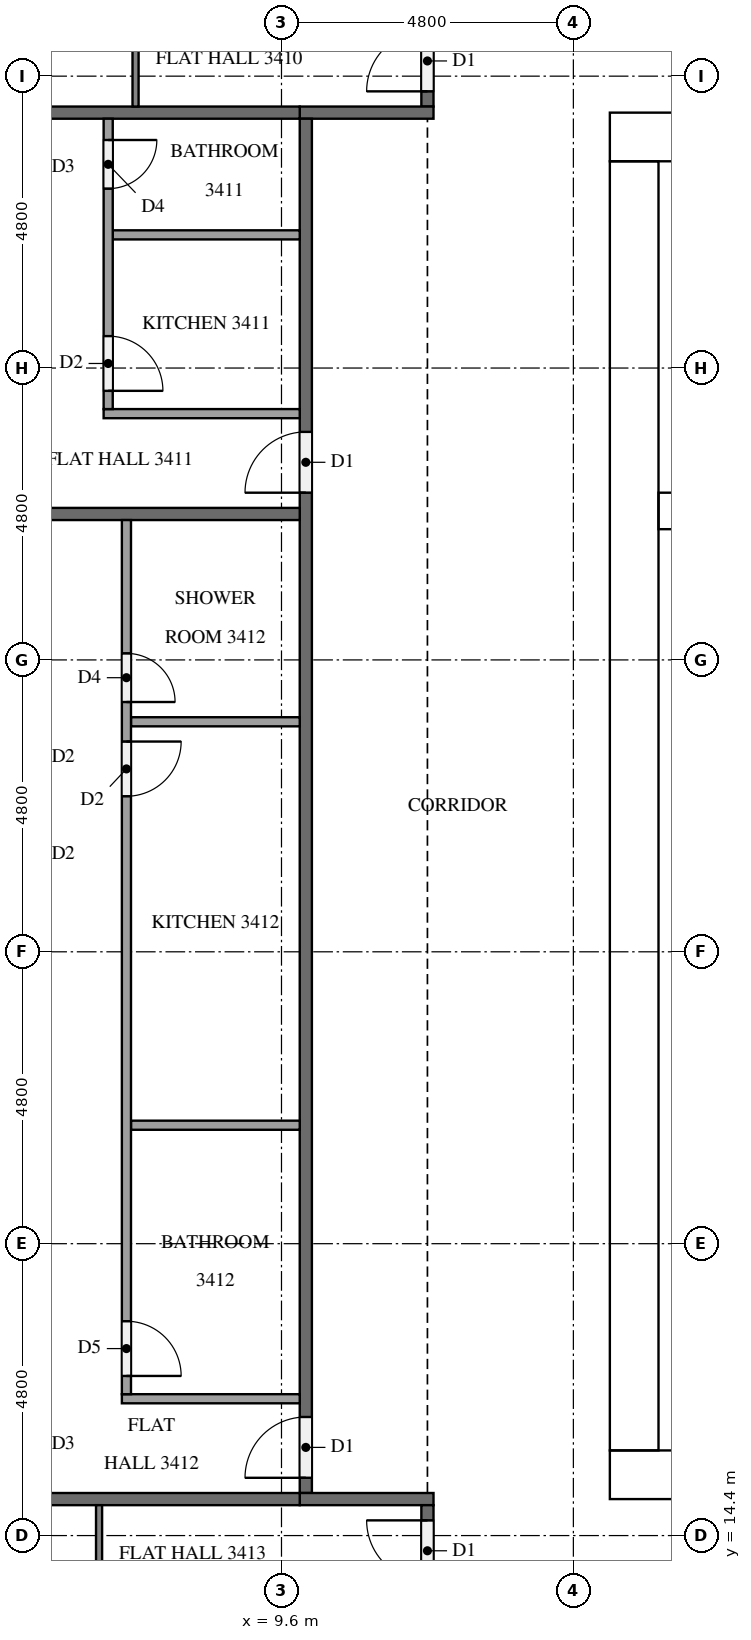
"""IFC4 building model, lengths in metres.
Left out: names, types, materials, properties, quantities, classifications, styles, units other than length and angle.
Written with IfcOpenShell. Run it as: python <this file> out.ifc"""

import sys

from ifc_helpers import new_model, si_unit, direction, frame, frame_2d, origin, place, context, subcontext, project, spatial, rectangle, extrude, element, fill, save


model = new_model("IFC4")
c1 = context("Model", 3, precision=1e-05, world=origin(), true_north=direction((0.0, 1.0)))
c2 = subcontext(c1, "Body", "Model", "MODEL_VIEW")
j1 = project(units=[si_unit("LENGTHUNIT", "METRE"), si_unit("PLANEANGLEUNIT", "RADIAN")], contexts=[c1])
p1 = place(None, origin())
s1 = spatial("IfcSite", under=j1, at=p1, CompositionType="ELEMENT")
p2 = place(p1, origin())
s2 = spatial("IfcBuilding", under=s1, at=p2, CompositionType="ELEMENT")
p3 = place(p2, frame((0.0, 0.0, 133.1)))
s3 = spatial("IfcBuildingStorey", under=s2, at=p3, CompositionType="ELEMENT", Elevation=133.1)
p4 = place(p3, frame((15.0, 15.4, 0.0), z_axis=(0.0, 0.0, 1.0), x_axis=(1.0, 0.0, 0.0)))
e1 = element("IfcWall", 1, at=p4, inside=s3, PredefinedType="SHEAR", context=c2, shape_type="SweptSolid", body=[
    extrude(rectangle(XDim=32.4, YDim=0.8, at=frame_2d((16.2, 0.0))), origin(), (0.0, 0.0, 1.0), 3.2),
])
p5 = place(p4, frame((15.3, 0.0, 0.0)))
e2 = element("IfcOpeningElement", 2, at=p5, cuts=e1, PredefinedType="OPENING", context=c2, shape_type="SweptSolid", body=[
    extrude(rectangle(XDim=1.8, YDim=2.1, at=frame_2d((0.9, 1.05))), frame((0.0, 0.41, 0.0), z_axis=(0.0, -1.0, 0.0), x_axis=(1.0, 0.0, 0.0)), (0.0, 0.0, 1.0), 0.82),
])
p6 = place(p3, frame((15.0, 37.4, 0.0), z_axis=(0.0, 0.0, 1.0), x_axis=(1.0, 0.0, 0.0)))
e3 = element("IfcWall", 3, at=p6, inside=s3, PredefinedType="SHEAR", context=c2, shape_type="SweptSolid", body=[
    extrude(rectangle(XDim=32.4, YDim=0.8, at=frame_2d((16.2, 0.0))), origin(), (0.0, 0.0, 1.0), 3.2),
])
p7 = place(p6, frame((15.3, 0.0, 0.0)))
e4 = element("IfcOpeningElement", 4, at=p7, cuts=e3, PredefinedType="OPENING", context=c2, shape_type="SweptSolid", body=[
    extrude(rectangle(XDim=1.8, YDim=2.1, at=frame_2d((0.9, 1.05))), frame((0.0, 0.41, 0.0), z_axis=(0.0, -1.0, 0.0), x_axis=(1.0, 0.0, 0.0)), (0.0, 0.0, 1.0), 0.82),
])
p8 = place(p6, frame((1.51, 0.0, 0.0)))
e5 = element("IfcOpeningElement", 5, at=p8, cuts=e3, PredefinedType="OPENING", context=c2, shape_type="SweptSolid", body=[
    extrude(rectangle(XDim=1.0, YDim=2.1, at=frame_2d((0.5, 1.05))), frame((0.0, 0.41, 0.0), z_axis=(0.0, -1.0, 0.0), x_axis=(1.0, 0.0, 0.0)), (0.0, 0.0, 1.0), 0.82),
])
p9 = place(p6, frame((5.11, 0.0, 0.0)))
e6 = element("IfcOpeningElement", 6, at=p9, cuts=e3, PredefinedType="OPENING", context=c2, shape_type="SweptSolid", body=[
    extrude(rectangle(XDim=1.0, YDim=2.1, at=frame_2d((0.5, 1.05))), frame((0.0, 0.41, 0.0), z_axis=(0.0, -1.0, 0.0), x_axis=(1.0, 0.0, 0.0)), (0.0, 0.0, 1.0), 0.82),
])
p10 = place(p3, frame((15.4, 15.8, 0.0), z_axis=(0.0, 0.0, 1.0), x_axis=(0.0, 1.0, 0.0)))
e7 = element("IfcWall", 7, at=p10, inside=s3, PredefinedType="SHEAR", context=c2, shape_type="SweptSolid", body=[
    extrude(rectangle(XDim=21.2, YDim=0.8, at=frame_2d((10.6, 0.0))), origin(), (0.0, 0.0, 1.0), 3.2),
])
p11 = place(p10, frame((4.96, 0.0, 0.0)))
e8 = element("IfcOpeningElement", 8, at=p11, cuts=e7, PredefinedType="OPENING", context=c2, shape_type="SweptSolid", body=[
    extrude(rectangle(XDim=1.2, YDim=2.1, at=frame_2d((0.6, 1.05))), frame((0.0, 0.41, 0.0), z_axis=(0.0, -1.0, 0.0), x_axis=(1.0, 0.0, 0.0)), (0.0, 0.0, 1.0), 0.82),
])
p12 = place(p3, frame((15.8, 31.25, 0.0), z_axis=(0.0, 0.0, 1.0), x_axis=(1.0, 0.0, 0.0)))
e9 = element("IfcWall", 9, at=p12, inside=s3, PredefinedType="SHEAR", context=c2, shape_type="SweptSolid", body=[
    extrude(rectangle(XDim=7.0, YDim=0.6, at=frame_2d((3.5, 0.0))), origin(), (0.0, 0.0, 1.0), 3.2),
])
p13 = place(p3, frame((12.0, 37.9, 0.0), z_axis=(0.0, 0.0, 1.0), x_axis=(0.0, 1.0, 0.0)))
e10 = element("IfcWall", 10, at=p13, inside=s3, PredefinedType="PARTITIONING", context=c2, shape_type="SweptSolid", body=[
    extrude(rectangle(XDim=2.8, YDim=0.2, at=frame_2d((1.4, 0.0))), origin(), (0.0, 0.0, 1.0), 3.2),
])
p14 = place(p13, frame((0.25, 0.0, 0.0)))
e11 = element("IfcOpeningElement", 11, at=p14, cuts=e10, PredefinedType="OPENING", context=c2, shape_type="SweptSolid", body=[
    extrude(rectangle(XDim=1.0, YDim=2.1, at=frame_2d((0.5, 1.05))), frame((0.0, 0.11, 0.0), z_axis=(0.0, -1.0, 0.0), x_axis=(1.0, 0.0, 0.0)), (0.0, 0.0, 1.0), 0.22),
])
p15 = place(p3, frame((12.1, 37.8, 0.0), z_axis=(0.0, 0.0, 1.0), x_axis=(-1.0, 0.0, 0.0)))
e12 = element("IfcWall", 12, at=p15, inside=s3, PredefinedType="PARTITIONING", context=c2, shape_type="SweptSolid", body=[
    extrude(rectangle(XDim=2.2, YDim=0.2, at=frame_2d((1.1, 0.0))), origin(), (0.0, 0.0, 1.0), 3.2),
])
p16 = place(p3, frame((10.0, 15.1, 0.0), z_axis=(0.0, 0.0, 1.0), x_axis=(0.0, 1.0, 0.0)))
e13 = element("IfcWall", 13, at=p16, inside=s3, PredefinedType="PARTITIONING", context=c2, shape_type="SweptSolid", body=[
    extrude(rectangle(XDim=22.6, YDim=0.2, at=frame_2d((11.3, 0.0))), origin(), (0.0, 0.0, 1.0), 3.2),
])
p17 = place(p16, frame((16.45, 0.0, 0.0)))
e14 = element("IfcOpeningElement", 14, at=p17, cuts=e13, PredefinedType="OPENING", context=c2, shape_type="SweptSolid", body=[
    extrude(rectangle(XDim=1.0, YDim=2.1, at=frame_2d((0.5, 1.05))), frame((0.0, 0.11, 0.0), z_axis=(0.0, -1.0, 0.0), x_axis=(1.0, 0.0, 0.0)), (0.0, 0.0, 1.0), 0.22),
])
p18 = place(p16, frame((0.25, 0.0, 0.0)))
e15 = element("IfcOpeningElement", 15, at=p18, cuts=e13, PredefinedType="OPENING", context=c2, shape_type="SweptSolid", body=[
    extrude(rectangle(XDim=1.0, YDim=2.1, at=frame_2d((0.5, 1.05))), frame((0.0, 0.11, 0.0), z_axis=(0.0, -1.0, 0.0), x_axis=(1.0, 0.0, 0.0)), (0.0, 0.0, 1.0), 0.22),
])
p19 = place(p3, frame((9.9, 15.0, 0.0), z_axis=(0.0, 0.0, 1.0), x_axis=(1.0, 0.0, 0.0)))
e16 = element("IfcWall", 16, at=p19, inside=s3, PredefinedType="PARTITIONING", context=c2, shape_type="SweptSolid", body=[
    extrude(rectangle(XDim=2.2, YDim=0.2, at=frame_2d((1.1, 0.0))), origin(), (0.0, 0.0, 1.0), 3.2),
])
p20 = place(p3, frame((12.0, 12.1, 0.0), z_axis=(0.0, 0.0, 1.0), x_axis=(0.0, 1.0, 0.0)))
e17 = element("IfcWall", 17, at=p20, inside=s3, PredefinedType="PARTITIONING", context=c2, shape_type="SweptSolid", body=[
    extrude(rectangle(XDim=2.8, YDim=0.2, at=frame_2d((1.4, 0.0))), origin(), (0.0, 0.0, 1.0), 3.2),
])
p21 = place(p20, frame((1.55, 0.0, 0.0)))
e18 = element("IfcOpeningElement", 18, at=p21, cuts=e17, PredefinedType="OPENING", context=c2, shape_type="SweptSolid", body=[
    extrude(rectangle(XDim=1.0, YDim=2.1, at=frame_2d((0.5, 1.05))), frame((0.0, 0.11, 0.0), z_axis=(0.0, -1.0, 0.0), x_axis=(1.0, 0.0, 0.0)), (0.0, 0.0, 1.0), 0.22),
])
p22 = place(p3, frame((0.375, 37.8, 0.0), z_axis=(0.0, 0.0, 1.0), x_axis=(1.0, 0.0, 0.0)))
e19 = element("IfcWall", 19, at=p22, inside=s3, PredefinedType="PARTITIONING", context=c2, shape_type="SweptSolid", body=[
    extrude(rectangle(XDim=9.525, YDim=0.2, at=frame_2d((4.762, 0.0))), origin(), (0.0, 0.0, 1.0), 3.2),
])
for number, where, z_axis, x_axis in (
    (20, (0.1, 31.2, 0.0), (0.0, 0.0, 1.0), (1.0, 0.0, 0.0)),
    (21, (0.1, 15.0, 0.0), (0.0, 0.0, 1.0), (1.0, 0.0, 0.0)),
):
    element("IfcWall", number, at=place(p3, frame(where, z_axis=z_axis, x_axis=x_axis)), inside=s3, PredefinedType="PARTITIONING", context=c2, shape_type="SweptSolid", body=[
        extrude(rectangle(XDim=9.8, YDim=0.2, at=frame_2d((4.9, 0.0))), origin(), (0.0, 0.0, 1.0), 3.2),
    ])
p23 = place(p3, frame((7.2, 37.9, 0.0), z_axis=(0.0, 0.0, 1.0), x_axis=(0.0, 1.0, 0.0)))
e22 = element("IfcWall", 22, at=p23, inside=s3, PredefinedType="PARTITIONING", context=c2, shape_type="SweptSolid", body=[
    extrude(rectangle(XDim=14.8, YDim=0.1, at=frame_2d((7.4, 0.0))), origin(), (0.0, 0.0, 1.0), 3.2),
])
p24 = place(p23, frame((4.05, 0.0, 0.0)))
e23 = element("IfcOpeningElement", 23, at=p24, cuts=e22, PredefinedType="OPENING", context=c2, shape_type="SweptSolid", body=[
    extrude(rectangle(XDim=0.9, YDim=2.1, at=frame_2d((0.45, 1.05))), frame((0.0, 0.06, 0.0), z_axis=(0.0, -1.0, 0.0), x_axis=(1.0, 0.0, 0.0)), (0.0, 0.0, 1.0), 0.12),
])
p25 = place(p23, frame((5.65, 0.0, 0.0)))
e24 = element("IfcOpeningElement", 24, at=p25, cuts=e22, PredefinedType="OPENING", context=c2, shape_type="SweptSolid", body=[
    extrude(rectangle(XDim=0.9, YDim=2.1, at=frame_2d((0.45, 1.05))), frame((0.0, 0.06, 0.0), z_axis=(0.0, -1.0, 0.0), x_axis=(1.0, 0.0, 0.0)), (0.0, 0.0, 1.0), 0.12),
])
p26 = place(p23, frame((13.5, 0.0, 0.0)))
e25 = element("IfcOpeningElement", 25, at=p26, cuts=e22, PredefinedType="OPENING", context=c2, shape_type="SweptSolid", body=[
    extrude(rectangle(XDim=1.0, YDim=2.1, at=frame_2d((0.5, 1.05))), frame((0.0, 0.06, 0.0), z_axis=(0.0, -1.0, 0.0), x_axis=(1.0, 0.0, 0.0)), (0.0, 0.0, 1.0), 0.12),
])
p27 = place(p3, frame((9.9, 35.79, 0.0), z_axis=(0.0, 0.0, 1.0), x_axis=(-1.0, 0.0, 0.0)))
e26 = element("IfcWall", 26, at=p27, inside=s3, PredefinedType="PARTITIONING", context=c2, shape_type="SweptSolid", body=[
    extrude(rectangle(XDim=3.075, YDim=0.15, at=frame_2d((1.538, 0.0))), origin(), (0.0, 0.0, 1.0), 3.2),
])
p28 = place(p3, frame((9.9, 32.85, 0.0), z_axis=(0.0, 0.0, 1.0), x_axis=(-1.0, 0.0, 0.0)))
e27 = element("IfcWall", 27, at=p28, inside=s3, PredefinedType="PARTITIONING", context=c2, shape_type="SweptSolid", body=[
    extrude(rectangle(XDim=3.225, YDim=0.15, at=frame_2d((1.612, 0.0))), origin(), (0.0, 0.0, 1.0), 3.2),
])
p29 = place(p3, frame((6.75, 37.7, 0.0), z_axis=(0.0, 0.0, 1.0), x_axis=(0.0, -1.0, 0.0)))
e28 = element("IfcWall", 28, at=p29, inside=s3, PredefinedType="PARTITIONING", context=c2, shape_type="SweptSolid", body=[
    extrude(rectangle(XDim=4.775, YDim=0.15, at=frame_2d((2.387, 0.0))), origin(), (0.0, 0.0, 1.0), 3.2),
])
p30 = place(p29, frame((3.575, 0.0, 0.0)))
e29 = element("IfcOpeningElement", 29, at=p30, cuts=e28, PredefinedType="OPENING", context=c2, shape_type="SweptSolid", body=[
    extrude(rectangle(XDim=0.9, YDim=2.1, at=frame_2d((0.45, 1.05))), frame((0.0, 0.085, 0.0), z_axis=(0.0, -1.0, 0.0), x_axis=(1.0, 0.0, 0.0)), (0.0, 0.0, 1.0), 0.17),
])
p31 = place(p29, frame((0.35, 0.0, 0.0)))
e30 = element("IfcOpeningElement", 30, at=p31, cuts=e28, PredefinedType="OPENING", context=c2, shape_type="SweptSolid", body=[
    extrude(rectangle(XDim=0.8, YDim=2.1, at=frame_2d((0.4, 1.05))), frame((0.0, 0.085, 0.0), z_axis=(0.0, -1.0, 0.0), x_axis=(1.0, 0.0, 0.0)), (0.0, 0.0, 1.0), 0.17),
])
for number, where, z_axis, x_axis in (
    (31, (9.9, 21.148, 0.0), (0.0, 0.0, 1.0), (-1.0, 0.0, 0.0)),
    (32, (9.9, 27.783, 0.0), (0.0, 0.0, 1.0), (-1.0, 0.0, 0.0)),
):
    element("IfcWall", number, at=place(p3, frame(where, z_axis=z_axis, x_axis=x_axis)), inside=s3, PredefinedType="PARTITIONING", context=c2, shape_type="SweptSolid", body=[
        extrude(rectangle(XDim=2.775, YDim=0.15, at=frame_2d((1.387, 0.0))), origin(), (0.0, 0.0, 1.0), 3.2),
    ])
p32 = place(p3, frame((9.9, 16.65, 0.0), z_axis=(0.0, 0.0, 1.0), x_axis=(-1.0, 0.0, 0.0)))
e33 = element("IfcWall", 33, at=p32, inside=s3, PredefinedType="PARTITIONING", context=c2, shape_type="SweptSolid", body=[
    extrude(rectangle(XDim=2.925, YDim=0.15, at=frame_2d((1.462, 0.0))), origin(), (0.0, 0.0, 1.0), 3.2),
])
p33 = place(p3, frame((7.05, 31.1, 0.0), z_axis=(0.0, 0.0, 1.0), x_axis=(0.0, -1.0, 0.0)))
e34 = element("IfcWall", 34, at=p33, inside=s3, PredefinedType="PARTITIONING", context=c2, shape_type="SweptSolid", body=[
    extrude(rectangle(XDim=14.375, YDim=0.15, at=frame_2d((7.188, 0.0))), origin(), (0.0, 0.0, 1.0), 3.2),
])
p34 = place(p33, frame((13.175, 0.0, 0.0)))
e35 = element("IfcOpeningElement", 35, at=p34, cuts=e34, PredefinedType="OPENING", context=c2, shape_type="SweptSolid", body=[
    extrude(rectangle(XDim=0.9, YDim=2.1, at=frame_2d((0.45, 1.05))), frame((0.0, 0.085, 0.0), z_axis=(0.0, -1.0, 0.0), x_axis=(1.0, 0.0, 0.0)), (0.0, 0.0, 1.0), 0.17),
])
p35 = place(p33, frame((3.642, 0.0, 0.0)))
e36 = element("IfcOpeningElement", 36, at=p35, cuts=e34, PredefinedType="OPENING", context=c2, shape_type="SweptSolid", body=[
    extrude(rectangle(XDim=0.9, YDim=2.1, at=frame_2d((0.45, 1.05))), frame((0.0, 0.085, 0.0), z_axis=(0.0, -1.0, 0.0), x_axis=(1.0, 0.0, 0.0)), (0.0, 0.0, 1.0), 0.17),
])
p36 = place(p33, frame((2.192, 0.0, 0.0)))
e37 = element("IfcOpeningElement", 37, at=p36, cuts=e34, PredefinedType="OPENING", context=c2, shape_type="SweptSolid", body=[
    extrude(rectangle(XDim=0.8, YDim=2.1, at=frame_2d((0.4, 1.05))), frame((0.0, 0.085, 0.0), z_axis=(0.0, -1.0, 0.0), x_axis=(1.0, 0.0, 0.0)), (0.0, 0.0, 1.0), 0.17),
])
p37 = place(p3, frame((6.6, 4.9, 0.0), z_axis=(0.0, 0.0, 1.0), x_axis=(0.0, 1.0, 0.0)))
e38 = element("IfcWall", 38, at=p37, inside=s3, PredefinedType="PARTITIONING", context=c2, shape_type="SweptSolid", body=[
    extrude(rectangle(XDim=10.0, YDim=0.1, at=frame_2d((5.0, 0.0))), origin(), (0.0, 0.0, 1.0), 3.2),
])
p38 = place(p37, frame((5.05, 0.0, 0.0)))
e39 = element("IfcOpeningElement", 39, at=p38, cuts=e38, PredefinedType="OPENING", context=c2, shape_type="SweptSolid", body=[
    extrude(rectangle(XDim=1.0, YDim=2.1, at=frame_2d((0.5, 1.05))), frame((0.0, 0.06, 0.0), z_axis=(0.0, -1.0, 0.0), x_axis=(1.0, 0.0, 0.0)), (0.0, 0.0, 1.0), 0.12),
])
p39 = place(p37, frame((3.45, 0.0, 0.0)))
e40 = element("IfcOpeningElement", 40, at=p39, cuts=e38, PredefinedType="OPENING", context=c2, shape_type="SweptSolid", body=[
    extrude(rectangle(XDim=0.9, YDim=2.1, at=frame_2d((0.45, 1.05))), frame((0.0, 0.06, 0.0), z_axis=(0.0, -1.0, 0.0), x_axis=(1.0, 0.0, 0.0)), (0.0, 0.0, 1.0), 0.12),
])
p40 = place(p11, frame((1.2, 0.0, 0.0), z_axis=(0.0, 0.0, 1.0), x_axis=(-1.0, 0.0, 0.0)))
e41 = element("IfcDoor", 41, at=p40, inside=s3, OperationType="SINGLE_SWING_LEFT", PredefinedType="DOOR", context=c2, shape_type="SweptSolid", body=[
    extrude(rectangle(XDim=1.2, YDim=2.1, at=frame_2d((0.6, 1.05))), frame((0.0, 0.025, 0.0), z_axis=(0.0, -1.0, 0.0), x_axis=(1.0, 0.0, 0.0)), (0.0, 0.0, 1.0), 0.05),
])
fill(e8, e41)
p41 = place(p14, origin())
e42 = element("IfcDoor", 42, at=p41, inside=s3, OperationType="SINGLE_SWING_LEFT", PredefinedType="DOOR", context=c2, shape_type="SweptSolid", body=[
    extrude(rectangle(XDim=1.0, YDim=2.1, at=frame_2d((0.5, 1.05))), frame((0.0, 0.025, 0.0), z_axis=(0.0, -1.0, 0.0), x_axis=(1.0, 0.0, 0.0)), (0.0, 0.0, 1.0), 0.05),
])
fill(e11, e42)
p42 = place(p17, origin())
e43 = element("IfcDoor", 43, at=p42, inside=s3, OperationType="SINGLE_SWING_LEFT", PredefinedType="DOOR", context=c2, shape_type="SweptSolid", body=[
    extrude(rectangle(XDim=1.0, YDim=2.1, at=frame_2d((0.5, 1.05))), frame((0.0, 0.025, 0.0), z_axis=(0.0, -1.0, 0.0), x_axis=(1.0, 0.0, 0.0)), (0.0, 0.0, 1.0), 0.05),
])
fill(e14, e43)
p43 = place(p18, origin())
e44 = element("IfcDoor", 44, at=p43, inside=s3, OperationType="SINGLE_SWING_LEFT", PredefinedType="DOOR", context=c2, shape_type="SweptSolid", body=[
    extrude(rectangle(XDim=1.0, YDim=2.1, at=frame_2d((0.5, 1.05))), frame((0.0, 0.025, 0.0), z_axis=(0.0, -1.0, 0.0), x_axis=(1.0, 0.0, 0.0)), (0.0, 0.0, 1.0), 0.05),
])
fill(e15, e44)
p44 = place(p21, origin())
e45 = element("IfcDoor", 45, at=p44, inside=s3, OperationType="SINGLE_SWING_RIGHT", PredefinedType="DOOR", context=c2, shape_type="SweptSolid", body=[
    extrude(rectangle(XDim=1.0, YDim=2.1, at=frame_2d((0.5, 1.05))), frame((0.0, 0.025, 0.0), z_axis=(0.0, -1.0, 0.0), x_axis=(1.0, 0.0, 0.0)), (0.0, 0.0, 1.0), 0.05),
])
fill(e18, e45)
p45 = place(p30, origin())
e46 = element("IfcDoor", 46, at=p45, inside=s3, OperationType="SINGLE_SWING_RIGHT", PredefinedType="DOOR", context=c2, shape_type="SweptSolid", body=[
    extrude(rectangle(XDim=0.9, YDim=2.1, at=frame_2d((0.45, 1.05))), frame((0.0, 0.025, 0.0), z_axis=(0.0, -1.0, 0.0), x_axis=(1.0, 0.0, 0.0)), (0.0, 0.0, 1.0), 0.05),
])
fill(e29, e46)
p46 = place(p31, origin())
e47 = element("IfcDoor", 47, at=p46, inside=s3, OperationType="SINGLE_SWING_LEFT", PredefinedType="DOOR", context=c2, shape_type="SweptSolid", body=[
    extrude(rectangle(XDim=0.8, YDim=2.1, at=frame_2d((0.4, 1.05))), frame((0.0, 0.025, 0.0), z_axis=(0.0, -1.0, 0.0), x_axis=(1.0, 0.0, 0.0)), (0.0, 0.0, 1.0), 0.05),
])
fill(e30, e47)
p47 = place(p34, origin())
e48 = element("IfcDoor", 48, at=p47, inside=s3, OperationType="SINGLE_SWING_RIGHT", PredefinedType="DOOR", context=c2, shape_type="SweptSolid", body=[
    extrude(rectangle(XDim=0.9, YDim=2.1, at=frame_2d((0.45, 1.05))), frame((0.0, 0.025, 0.0), z_axis=(0.0, -1.0, 0.0), x_axis=(1.0, 0.0, 0.0)), (0.0, 0.0, 1.0), 0.05),
])
fill(e35, e48)
p48 = place(p35, origin())
e49 = element("IfcDoor", 49, at=p48, inside=s3, OperationType="SINGLE_SWING_LEFT", PredefinedType="DOOR", context=c2, shape_type="SweptSolid", body=[
    extrude(rectangle(XDim=0.9, YDim=2.1, at=frame_2d((0.45, 1.05))), frame((0.0, 0.025, 0.0), z_axis=(0.0, -1.0, 0.0), x_axis=(1.0, 0.0, 0.0)), (0.0, 0.0, 1.0), 0.05),
])
fill(e36, e49)
p49 = place(p36, origin())
e50 = element("IfcDoor", 50, at=p49, inside=s3, OperationType="SINGLE_SWING_RIGHT", PredefinedType="DOOR", context=c2, shape_type="SweptSolid", body=[
    extrude(rectangle(XDim=0.8, YDim=2.1, at=frame_2d((0.4, 1.05))), frame((0.0, 0.025, 0.0), z_axis=(0.0, -1.0, 0.0), x_axis=(1.0, 0.0, 0.0)), (0.0, 0.0, 1.0), 0.05),
])
fill(e37, e50)
save(model, sys.argv[1])
